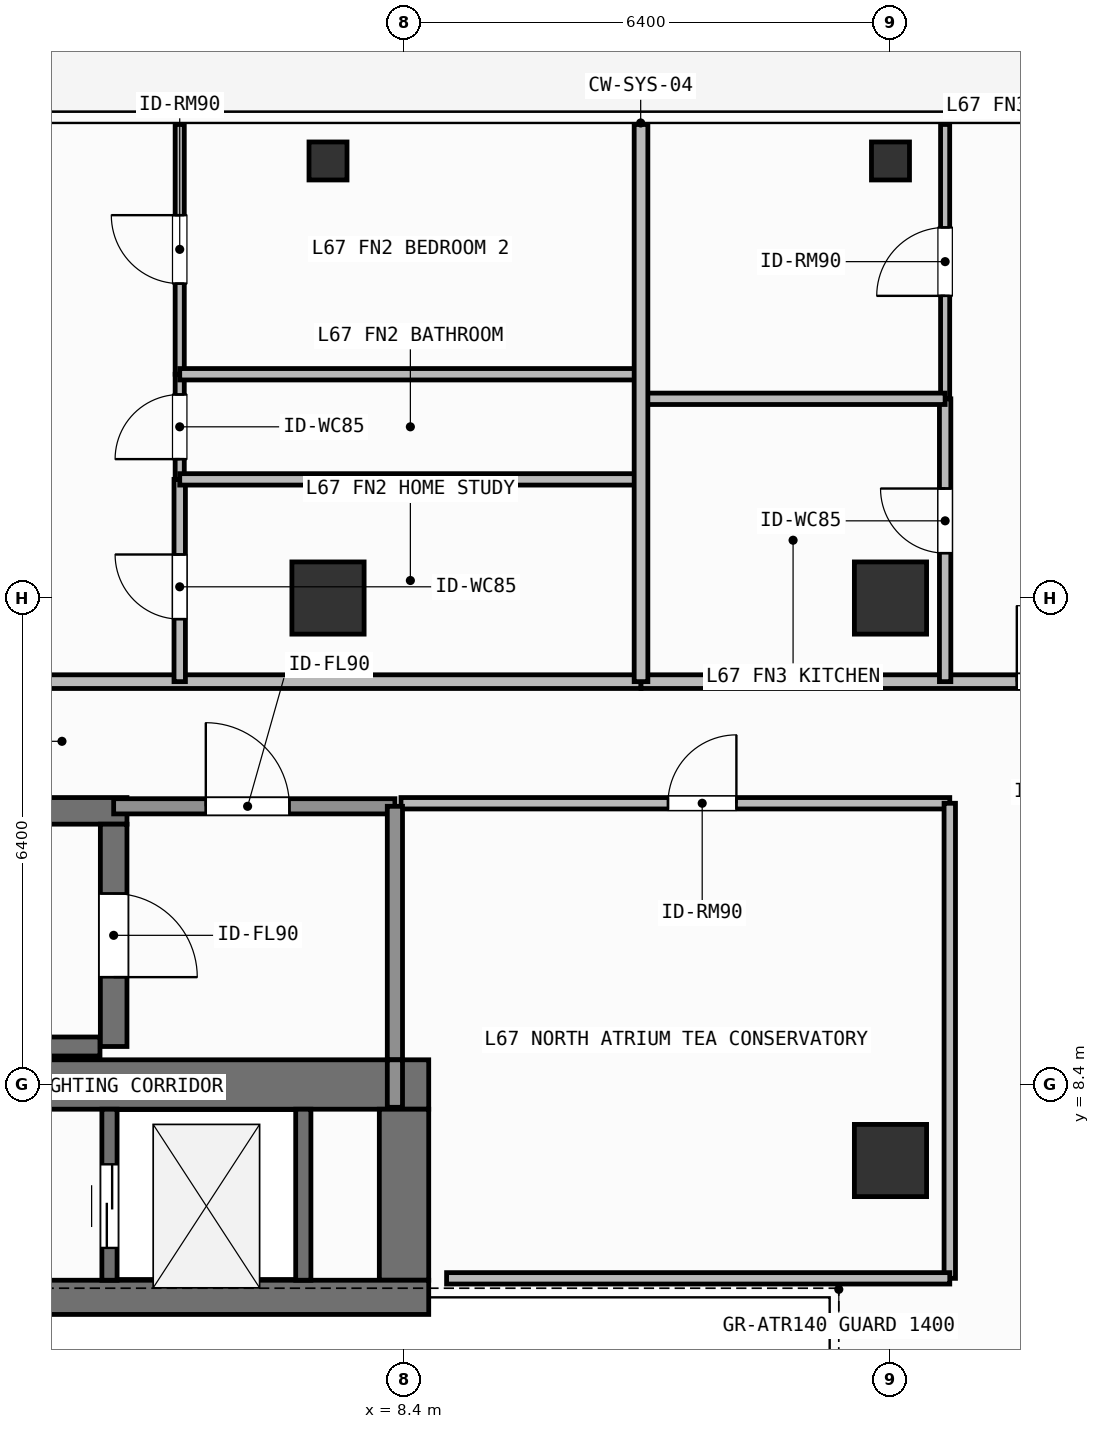
"""IFC4 building model, lengths in metres.
Left out: names, types, materials, properties, quantities, classifications, styles, units other than length and angle.
Written with IfcOpenShell. Run it as: python <this file> out.ifc"""

import sys

from ifc_helpers import new_model, si_unit, direction, frame, frame_2d, origin, origin_2d, place, context, subcontext, project, spatial, rectangle, hollow_rectangle, extrude, element, fill, save


model = new_model("IFC4")
c1 = context("Model", 3, precision=1e-05, world=origin(), true_north=direction((0.0, 1.0)))
c2 = subcontext(c1, "Body", "Model", "MODEL_VIEW")
j1 = project(units=[si_unit("LENGTHUNIT", "METRE"), si_unit("PLANEANGLEUNIT", "RADIAN")], contexts=[c1])
p1 = place(None, origin())
s1 = spatial("IfcSite", under=j1, at=p1, CompositionType="ELEMENT")
p2 = place(p1, origin())
s2 = spatial("IfcBuilding", under=s1, at=p2, CompositionType="ELEMENT")
p3 = place(p2, frame((0.0, 0.0, 274.2)))
s3 = spatial("IfcBuildingStorey", under=s2, at=p3, CompositionType="ELEMENT", Elevation=274.2)
p4 = place(p3, frame((-7.55, 8.4, 0.0), z_axis=(0.0, 0.0, 1.0), x_axis=(1.0, 0.0, 0.0)))
e1 = element("IfcWall", 1, at=p4, inside=s3, PredefinedType="SHEAR", context=c2, shape_type="SweptSolid", body=[
    extrude(rectangle(XDim=16.275, YDim=0.65, at=frame_2d((8.138, 0.0))), origin(), (0.0, 0.0, 1.0), 3.9),
])
p5 = place(p3, frame((8.4, 5.825, 0.0), z_axis=(0.0, 0.0, 1.0), x_axis=(0.0, 1.0, 0.0)))
e2 = element("IfcWall", 2, at=p5, inside=s3, PredefinedType="SHEAR", context=c2, shape_type="SweptSolid", body=[
    extrude(rectangle(XDim=2.25, YDim=0.65, at=frame_2d((1.125, 0.0))), origin(), (0.0, 0.0, 1.0), 3.9),
])
p6 = place(p3, frame((3.045, 5.6, 0.0), z_axis=(0.0, 0.0, 1.0), x_axis=(1.0, 0.0, 0.0)))
e3 = element("IfcWall", 3, at=p6, inside=s3, PredefinedType="SHEAR", context=c2, shape_type="SweptSolid", body=[
    extrude(rectangle(XDim=5.68, YDim=0.45, at=frame_2d((2.84, 0.0))), origin(), (0.0, 0.0, 1.0), 3.9),
])
p7 = place(p3, frame((-2.555, 12.0, 0.0), z_axis=(0.0, 0.0, 1.0), x_axis=(1.0, 0.0, 0.0)))
e4 = element("IfcWall", 4, at=p7, inside=s3, PredefinedType="SHEAR", context=c2, shape_type="SweptSolid", body=[
    extrude(rectangle(XDim=7.31, YDim=0.35, at=frame_2d((3.655, 0.0))), origin(), (0.0, 0.0, 1.0), 3.9),
])
p8 = place(p3, frame((-2.2, 8.9, 0.0), z_axis=(0.0, 0.0, 1.0), x_axis=(1.0, 0.0, 0.0)))
e5 = element("IfcWall", 5, at=p8, inside=s3, PredefinedType="SHEAR", context=c2, shape_type="SweptSolid", body=[
    extrude(rectangle(XDim=6.6, YDim=0.25, at=frame_2d((3.3, 0.0))), origin(), (0.0, 0.0, 1.0), 3.9),
])
p9 = place(p3, frame((4.58, 11.825, 0.0), z_axis=(0.0, 0.0, 1.0), x_axis=(0.0, -1.0, 0.0)))
e6 = element("IfcWall", 6, at=p9, inside=s3, PredefinedType="SHEAR", context=c2, shape_type="SweptSolid", body=[
    extrude(rectangle(XDim=2.925, YDim=0.35, at=frame_2d((1.462, 0.0))), origin(), (0.0, 0.0, 1.0), 3.9),
])
p10 = place(p9, frame((0.913, 0.0, 0.0)))
e7 = element("IfcOpeningElement", 7, at=p10, cuts=e6, PredefinedType="OPENING", context=c2, shape_type="SweptSolid", body=[
    extrude(rectangle(XDim=1.1, YDim=2.15, at=frame_2d((0.55, 1.075))), frame((0.0, 0.185, 0.0), z_axis=(0.0, -1.0, 0.0), x_axis=(1.0, 0.0, 0.0)), (0.0, 0.0, 1.0), 0.37),
])
for number, where, z_axis, x_axis in (
    (8, (7.4, 14.8, 0.0), (0.0, 0.0, 1.0), (1.0, 0.0, 0.0)),
    (9, (14.8, 14.8, 0.0), (0.0, 0.0, 1.0), (1.0, 0.0, 0.0)),
    (10, (14.8, 7.4, 0.0), (0.0, 0.0, 1.0), (1.0, 0.0, 0.0)),
):
    element("IfcColumn", number, at=place(p3, frame(where, z_axis=z_axis, x_axis=x_axis)), inside=s3, PredefinedType="COLUMN", context=c2, shape_type="SweptSolid", body=[
        extrude(rectangle(XDim=0.95, YDim=0.95, at=origin_2d()), origin(), (0.0, 0.0, 1.0), 3.9),
    ])
for number, where, z_axis, x_axis in (
    (11, (7.4, 20.55, 0.0), (0.0, 0.0, 1.0), (1.0, 0.0, 0.0)),
    (12, (14.8, 20.55, 0.0), (0.0, 0.0, 1.0), (1.0, 0.0, 0.0)),
):
    element("IfcColumn", number, at=place(p3, frame(where, z_axis=z_axis, x_axis=x_axis)), inside=s3, PredefinedType="COLUMN", context=c2, shape_type="SweptSolid", body=[
        extrude(hollow_rectangle(XDim=0.5, YDim=0.5, WallThickness=0.025, at=origin_2d()), origin(), (0.0, 0.0, 1.0), 3.9),
    ])
p11 = place(p3, frame((4.525, 5.825, 0.0), z_axis=(0.0, 0.0, 1.0), x_axis=(0.0, 1.0, 0.0)))
e13 = element("IfcWall", 13, at=p11, inside=s3, PredefinedType="SHEAR", context=c2, shape_type="SweptSolid", body=[
    extrude(rectangle(XDim=2.25, YDim=0.2, at=frame_2d((1.125, 0.0))), origin(), (0.0, 0.0, 1.0), 3.68),
])
p12 = place(p11, frame((0.425, 0.0, 0.0)))
e14 = element("IfcOpeningElement", 14, at=p12, cuts=e13, PredefinedType="OPENING", context=c2, shape_type="SweptSolid", body=[
    extrude(rectangle(XDim=1.1, YDim=2.2, at=frame_2d((0.55, 1.1))), frame((0.0, 0.11, 0.0), z_axis=(0.0, -1.0, 0.0), x_axis=(1.0, 0.0, 0.0)), (0.0, 0.0, 1.0), 0.22),
])
p13 = place(p3, frame((7.075, 5.825, 0.0), z_axis=(0.0, 0.0, 1.0), x_axis=(0.0, 1.0, 0.0)))
e15 = element("IfcWall", 15, at=p13, inside=s3, PredefinedType="SHEAR", context=c2, shape_type="SweptSolid", body=[
    extrude(rectangle(XDim=2.25, YDim=0.2, at=frame_2d((1.125, 0.0))), origin(), (0.0, 0.0, 1.0), 3.68),
])
p14 = place(p3, frame((4.58, 12.06, 0.0), z_axis=(0.0, 0.0, 1.0), x_axis=(1.0, 0.0, 0.0)))
e16 = element("IfcWall", 16, at=p14, inside=s3, PredefinedType="SOLIDWALL", context=c2, shape_type="SweptSolid", body=[
    extrude(rectangle(XDim=3.7, YDim=0.2, at=frame_2d((1.85, 0.0))), origin(), (0.0, 0.0, 1.0), 3.68),
])
p15 = place(p14, frame((1.212, 0.0, 0.0)))
e17 = element("IfcOpeningElement", 17, at=p15, cuts=e16, PredefinedType="OPENING", context=c2, shape_type="SweptSolid", body=[
    extrude(rectangle(XDim=1.1, YDim=2.15, at=frame_2d((0.55, 1.075))), frame((0.0, 0.11, 0.0), z_axis=(0.0, -1.0, 0.0), x_axis=(1.0, 0.0, 0.0)), (0.0, 0.0, 1.0), 0.22),
])
p16 = place(p3, frame((8.36, 12.1, 0.0), z_axis=(0.0, 0.0, 1.0), x_axis=(1.0, 0.0, 0.0)))
e18 = element("IfcWall", 18, at=p16, inside=s3, PredefinedType="PARTITIONING", context=c2, shape_type="SweptSolid", body=[
    extrude(rectangle(XDim=7.22, YDim=0.15, at=frame_2d((3.61, 0.0))), origin(), (0.0, 0.0, 1.0), 3.68),
])
p17 = place(p16, frame((3.513, 0.0, 0.0)))
e19 = element("IfcOpeningElement", 19, at=p17, cuts=e18, PredefinedType="OPENING", context=c2, shape_type="SweptSolid", body=[
    extrude(rectangle(XDim=0.9, YDim=2.1, at=frame_2d((0.45, 1.05))), frame((0.0, 0.085, 0.0), z_axis=(0.0, -1.0, 0.0), x_axis=(1.0, 0.0, 0.0)), (0.0, 0.0, 1.0), 0.17),
])
p18 = place(p3, frame((-5.85, 13.7, 0.0), z_axis=(0.0, 0.0, 1.0), x_axis=(1.0, 0.0, 0.0)))
e20 = element("IfcWall", 20, at=p18, inside=s3, PredefinedType="PARTITIONING", context=c2, shape_type="SweptSolid", body=[
    extrude(rectangle(XDim=17.368, YDim=0.18, at=frame_2d((8.684, 0.0))), origin(), (0.0, 0.0, 1.0), 3.68),
])
p19 = place(p18, frame((7.114, 0.0, 0.0)))
e21 = element("IfcOpeningElement", 21, at=p19, cuts=e20, PredefinedType="OPENING", context=c2, shape_type="SweptSolid", body=[
    extrude(rectangle(XDim=1.0, YDim=2.2, at=frame_2d((0.5, 1.1))), frame((0.0, 0.1, 0.0), z_axis=(0.0, -1.0, 0.0), x_axis=(1.0, 0.0, 0.0)), (0.0, 0.0, 1.0), 0.2),
])
p20 = place(p3, frame((5.449, 13.7, 0.0), z_axis=(0.0, 0.0, 1.0), x_axis=(0.0, 1.0, 0.0)))
e22 = element("IfcWall", 22, at=p20, inside=s3, PredefinedType="PARTITIONING", context=c2, shape_type="SweptSolid", body=[
    extrude(rectangle(XDim=2.661, YDim=0.15, at=frame_2d((1.331, 0.0))), origin(), (0.0, 0.0, 1.0), 3.68),
])
p21 = place(p20, frame((0.823, 0.0, 0.0)))
e23 = element("IfcOpeningElement", 23, at=p21, cuts=e22, PredefinedType="OPENING", context=c2, shape_type="SweptSolid", body=[
    extrude(rectangle(XDim=0.85, YDim=2.1, at=frame_2d((0.425, 1.05))), frame((0.0, 0.085, 0.0), z_axis=(0.0, -1.0, 0.0), x_axis=(1.0, 0.0, 0.0)), (0.0, 0.0, 1.0), 0.17),
])
p22 = place(p3, frame((5.449, 16.361, 0.0), z_axis=(0.0, 0.0, 1.0), x_axis=(0.0, 1.0, 0.0)))
e24 = element("IfcWall", 24, at=p22, inside=s3, PredefinedType="PARTITIONING", context=c2, shape_type="SweptSolid", body=[
    extrude(rectangle(XDim=1.383, YDim=0.12, at=frame_2d((0.691, 0.0))), origin(), (0.0, 0.0, 1.0), 3.68),
])
p23 = place(p22, frame((0.267, 0.0, 0.0)))
e25 = element("IfcOpeningElement", 25, at=p23, cuts=e24, PredefinedType="OPENING", context=c2, shape_type="SweptSolid", body=[
    extrude(rectangle(XDim=0.85, YDim=2.1, at=frame_2d((0.425, 1.05))), frame((0.0, 0.07, 0.0), z_axis=(0.0, -1.0, 0.0), x_axis=(1.0, 0.0, 0.0)), (0.0, 0.0, 1.0), 0.14),
])
p24 = place(p3, frame((5.449, 17.744, 0.0), z_axis=(0.0, 0.0, 1.0), x_axis=(0.0, 1.0, 0.0)))
e26 = element("IfcWall", 26, at=p24, inside=s3, PredefinedType="PARTITIONING", context=c2, shape_type="SweptSolid", body=[
    extrude(rectangle(XDim=3.286, YDim=0.12, at=frame_2d((1.643, 0.0))), origin(), (0.0, 0.0, 1.0), 3.68),
])
p25 = place(p24, frame((1.193, 0.0, 0.0)))
e27 = element("IfcOpeningElement", 27, at=p25, cuts=e26, PredefinedType="OPENING", context=c2, shape_type="SweptSolid", body=[
    extrude(rectangle(XDim=0.9, YDim=2.1, at=frame_2d((0.45, 1.05))), frame((0.0, 0.07, 0.0), z_axis=(0.0, -1.0, 0.0), x_axis=(1.0, 0.0, 0.0)), (0.0, 0.0, 1.0), 0.14),
])
p26 = place(p3, frame((11.518, 13.7, 0.0), z_axis=(0.0, 0.0, 1.0), x_axis=(1.0, 0.0, 0.0)))
e28 = element("IfcWall", 28, at=p26, inside=s3, PredefinedType="PARTITIONING", context=c2, shape_type="SweptSolid", body=[
    extrude(rectangle(XDim=10.002, YDim=0.18, at=frame_2d((5.001, 0.0))), origin(), (0.0, 0.0, 1.0), 3.68),
])
p27 = place(p26, frame((4.944, 0.0, 0.0)))
e29 = element("IfcOpeningElement", 29, at=p27, cuts=e28, PredefinedType="OPENING", context=c2, shape_type="SweptSolid", body=[
    extrude(rectangle(XDim=1.0, YDim=2.2, at=frame_2d((0.5, 1.1))), frame((0.0, 0.1, 0.0), z_axis=(0.0, -1.0, 0.0), x_axis=(1.0, 0.0, 0.0)), (0.0, 0.0, 1.0), 0.2),
])
p28 = place(p3, frame((15.519, 13.7, 0.0), z_axis=(0.0, 0.0, 1.0), x_axis=(0.0, 1.0, 0.0)))
e30 = element("IfcWall", 30, at=p28, inside=s3, PredefinedType="PARTITIONING", context=c2, shape_type="SweptSolid", body=[
    extrude(rectangle(XDim=3.721, YDim=0.15, at=frame_2d((1.86, 0.0))), origin(), (0.0, 0.0, 1.0), 3.68),
])
p29 = place(p28, frame((1.691, 0.0, 0.0)))
e31 = element("IfcOpeningElement", 31, at=p29, cuts=e30, PredefinedType="OPENING", context=c2, shape_type="SweptSolid", body=[
    extrude(rectangle(XDim=0.85, YDim=2.1, at=frame_2d((0.425, 1.05))), frame((0.0, 0.085, 0.0), z_axis=(0.0, -1.0, 0.0), x_axis=(1.0, 0.0, 0.0)), (0.0, 0.0, 1.0), 0.17),
])
p30 = place(p3, frame((15.519, 17.421, 0.0), z_axis=(0.0, 0.0, 1.0), x_axis=(0.0, 1.0, 0.0)))
e32 = element("IfcWall", 32, at=p30, inside=s3, PredefinedType="PARTITIONING", context=c2, shape_type="SweptSolid", body=[
    extrude(rectangle(XDim=3.609, YDim=0.12, at=frame_2d((1.805, 0.0))), origin(), (0.0, 0.0, 1.0), 3.68),
])
p31 = place(p30, frame((1.354, 0.0, 0.0)))
e33 = element("IfcOpeningElement", 33, at=p31, cuts=e32, PredefinedType="OPENING", context=c2, shape_type="SweptSolid", body=[
    extrude(rectangle(XDim=0.9, YDim=2.1, at=frame_2d((0.45, 1.05))), frame((0.0, 0.07, 0.0), z_axis=(0.0, -1.0, 0.0), x_axis=(1.0, 0.0, 0.0)), (0.0, 0.0, 1.0), 0.14),
])
p32 = place(p3, frame((8.28, 8.725, 0.0), z_axis=(0.0, 0.0, 1.0), x_axis=(0.0, 1.0, 0.0)))
e34 = element("IfcWall", 34, at=p32, inside=s3, PredefinedType="SOLIDWALL", context=c2, shape_type="SweptSolid", body=[
    extrude(rectangle(XDim=3.335, YDim=0.2, at=frame_2d((1.667, 0.0))), origin(), (0.0, 0.0, 1.0), 3.68),
])
p33 = place(p3, frame((8.28, 8.1, 0.0), z_axis=(0.0, 0.0, 1.0), x_axis=(0.0, 1.0, 0.0)))
e35 = element("IfcWall", 35, at=p33, inside=s3, PredefinedType="SOLIDWALL", context=c2, shape_type="SweptSolid", body=[
    extrude(rectangle(XDim=0.625, YDim=0.2, at=frame_2d((0.312, 0.0))), origin(), (0.0, 0.0, 1.0), 3.68),
])
p34 = place(p3, frame((15.58, 5.85, 0.0), z_axis=(0.0, 0.0, 1.0), x_axis=(0.0, 1.0, 0.0)))
e36 = element("IfcWall", 36, at=p34, inside=s3, PredefinedType="PARTITIONING", context=c2, shape_type="SweptSolid", body=[
    extrude(rectangle(XDim=6.25, YDim=0.15, at=frame_2d((3.125, 0.0))), origin(), (0.0, 0.0, 1.0), 3.68),
])
p35 = place(p3, frame((8.96, 5.85, 0.0), z_axis=(0.0, 0.0, 1.0), x_axis=(1.0, 0.0, 0.0)))
e37 = element("IfcWall", 37, at=p35, inside=s3, PredefinedType="PARTITIONING", context=c2, shape_type="SweptSolid", body=[
    extrude(rectangle(XDim=6.62, YDim=0.15, at=frame_2d((3.31, 0.0))), origin(), (0.0, 0.0, 1.0), 3.68),
])
for number, where, z_axis, x_axis in (
    (38, (5.449, 16.361, 0.0), (0.0, 0.0, 1.0), (1.0, 0.0, 0.0)),
    (39, (5.449, 17.744, 0.0), (0.0, 0.0, 1.0), (1.0, 0.0, 0.0)),
):
    element("IfcWall", number, at=place(p3, frame(where, z_axis=z_axis, x_axis=x_axis)), inside=s3, PredefinedType="PARTITIONING", context=c2, shape_type="SweptSolid", body=[
        extrude(rectangle(XDim=6.069, YDim=0.15, at=frame_2d((3.035, 0.0))), origin(), (0.0, 0.0, 1.0), 3.68),
    ])
p36 = place(p3, frame((11.518, 17.421, 0.0), z_axis=(0.0, 0.0, 1.0), x_axis=(1.0, 0.0, 0.0)))
e40 = element("IfcWall", 40, at=p36, inside=s3, PredefinedType="PARTITIONING", context=c2, shape_type="SweptSolid", body=[
    extrude(rectangle(XDim=4.001, YDim=0.15, at=frame_2d((2.0, 0.0))), origin(), (0.0, 0.0, 1.0), 3.68),
])
p37 = place(p3, frame((11.518, 13.7, 0.0), z_axis=(0.0, 0.0, 1.0), x_axis=(0.0, 1.0, 0.0)))
e41 = element("IfcWall", 41, at=p37, inside=s3, PredefinedType="PARTITIONING", context=c2, shape_type="SweptSolid", body=[
    extrude(rectangle(XDim=7.33, YDim=0.18, at=frame_2d((3.665, 0.0))), origin(), (0.0, 0.0, 1.0), 3.68),
])
p38 = place(p12, origin())
e42 = element("IfcDoor", 42, at=p38, inside=s3, OperationType="SLIDING_TO_LEFT", PredefinedType="DOOR", context=c2, shape_type="SweptSolid", body=[
    extrude(rectangle(XDim=1.1, YDim=2.2, at=frame_2d((0.55, 1.1))), frame((0.0, 0.025, 0.0), z_axis=(0.0, -1.0, 0.0), x_axis=(1.0, 0.0, 0.0)), (0.0, 0.0, 1.0), 0.05),
])
fill(e14, e42)
p39 = place(p10, origin())
e43 = element("IfcDoor", 43, at=p39, inside=s3, OperationType="SINGLE_SWING_RIGHT", PredefinedType="DOOR", context=c2, shape_type="SweptSolid", body=[
    extrude(rectangle(XDim=1.1, YDim=2.15, at=frame_2d((0.55, 1.075))), frame((0.0, 0.025, 0.0), z_axis=(0.0, -1.0, 0.0), x_axis=(1.0, 0.0, 0.0)), (0.0, 0.0, 1.0), 0.05),
])
fill(e7, e43)
p40 = place(p15, origin())
e44 = element("IfcDoor", 44, at=p40, inside=s3, OperationType="SINGLE_SWING_LEFT", PredefinedType="DOOR", context=c2, shape_type="SweptSolid", body=[
    extrude(rectangle(XDim=1.1, YDim=2.15, at=frame_2d((0.55, 1.075))), frame((0.0, 0.025, 0.0), z_axis=(0.0, -1.0, 0.0), x_axis=(1.0, 0.0, 0.0)), (0.0, 0.0, 1.0), 0.05),
])
fill(e17, e44)
p41 = place(p17, origin())
e45 = element("IfcDoor", 45, at=p41, inside=s3, OperationType="SINGLE_SWING_RIGHT", PredefinedType="DOOR", context=c2, shape_type="SweptSolid", body=[
    extrude(rectangle(XDim=0.9, YDim=2.1, at=frame_2d((0.45, 1.05))), frame((0.0, 0.025, 0.0), z_axis=(0.0, -1.0, 0.0), x_axis=(1.0, 0.0, 0.0)), (0.0, 0.0, 1.0), 0.05),
])
fill(e19, e45)
p42 = place(p21, origin())
e46 = element("IfcDoor", 46, at=p42, inside=s3, OperationType="SINGLE_SWING_RIGHT", PredefinedType="DOOR", context=c2, shape_type="SweptSolid", body=[
    extrude(rectangle(XDim=0.85, YDim=2.1, at=frame_2d((0.425, 1.05))), frame((0.0, 0.025, 0.0), z_axis=(0.0, -1.0, 0.0), x_axis=(1.0, 0.0, 0.0)), (0.0, 0.0, 1.0), 0.05),
])
fill(e23, e46)
p43 = place(p23, origin())
e47 = element("IfcDoor", 47, at=p43, inside=s3, OperationType="SINGLE_SWING_LEFT", PredefinedType="DOOR", context=c2, shape_type="SweptSolid", body=[
    extrude(rectangle(XDim=0.85, YDim=2.1, at=frame_2d((0.425, 1.05))), frame((0.0, 0.025, 0.0), z_axis=(0.0, -1.0, 0.0), x_axis=(1.0, 0.0, 0.0)), (0.0, 0.0, 1.0), 0.05),
])
fill(e25, e47)
p44 = place(p25, origin())
e48 = element("IfcDoor", 48, at=p44, inside=s3, OperationType="SINGLE_SWING_RIGHT", PredefinedType="DOOR", context=c2, shape_type="SweptSolid", body=[
    extrude(rectangle(XDim=0.9, YDim=2.1, at=frame_2d((0.45, 1.05))), frame((0.0, 0.025, 0.0), z_axis=(0.0, -1.0, 0.0), x_axis=(1.0, 0.0, 0.0)), (0.0, 0.0, 1.0), 0.05),
])
fill(e27, e48)
p45 = place(p27, origin())
e49 = element("IfcDoor", 49, at=p45, inside=s3, OperationType="SINGLE_SWING_LEFT", PredefinedType="DOOR", context=c2, shape_type="SweptSolid", body=[
    extrude(rectangle(XDim=1.0, YDim=2.2, at=frame_2d((0.5, 1.1))), frame((0.0, 0.025, 0.0), z_axis=(0.0, -1.0, 0.0), x_axis=(1.0, 0.0, 0.0)), (0.0, 0.0, 1.0), 0.05),
])
fill(e29, e49)
p46 = place(p29, origin())
e50 = element("IfcDoor", 50, at=p46, inside=s3, OperationType="SINGLE_SWING_RIGHT", PredefinedType="DOOR", context=c2, shape_type="SweptSolid", body=[
    extrude(rectangle(XDim=0.85, YDim=2.1, at=frame_2d((0.425, 1.05))), frame((0.0, 0.025, 0.0), z_axis=(0.0, -1.0, 0.0), x_axis=(1.0, 0.0, 0.0)), (0.0, 0.0, 1.0), 0.05),
])
fill(e31, e50)
p47 = place(p31, origin())
e51 = element("IfcDoor", 51, at=p47, inside=s3, OperationType="SINGLE_SWING_LEFT", PredefinedType="DOOR", context=c2, shape_type="SweptSolid", body=[
    extrude(rectangle(XDim=0.9, YDim=2.1, at=frame_2d((0.45, 1.05))), frame((0.0, 0.025, 0.0), z_axis=(0.0, -1.0, 0.0), x_axis=(1.0, 0.0, 0.0)), (0.0, 0.0, 1.0), 0.05),
])
fill(e33, e51)
save(model, sys.argv[1])
